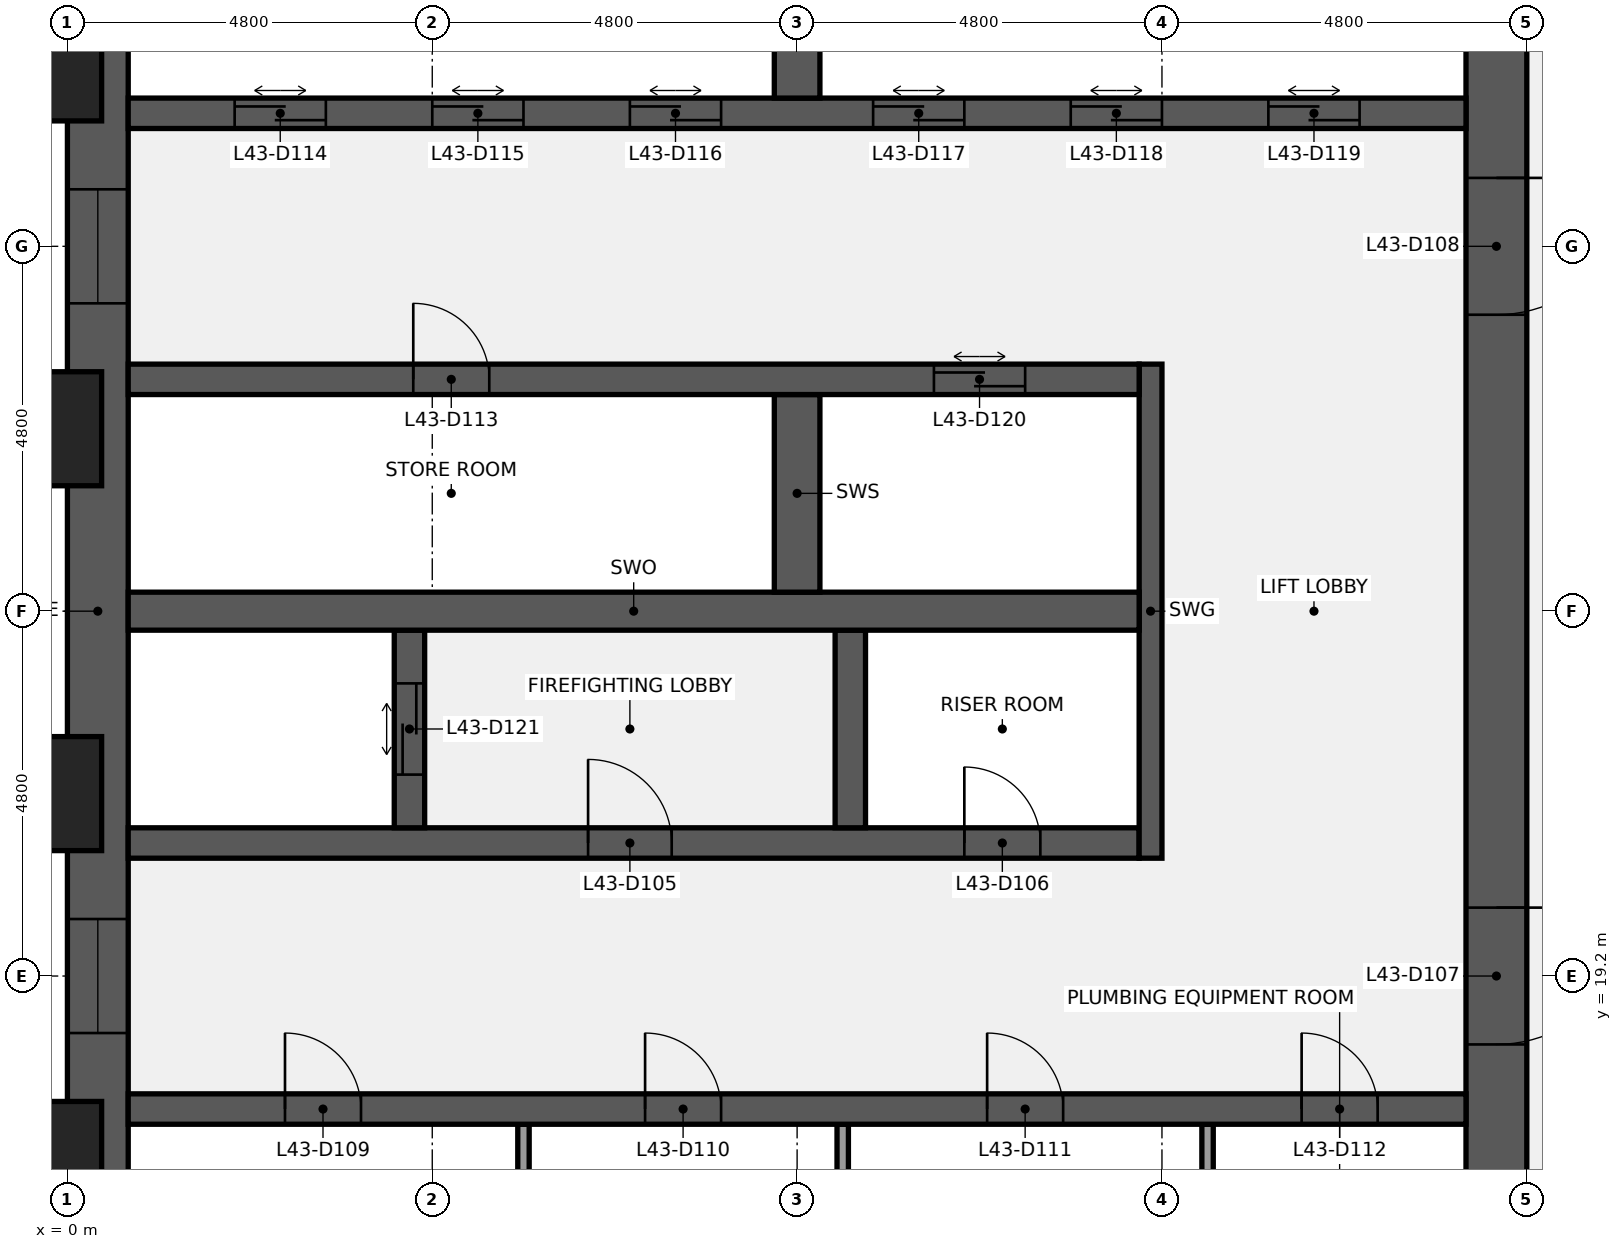
"""IFC4 building model, lengths in metres.
Left out: names, types, materials, properties, quantities, classifications, styles, units other than length and angle.
Written with IfcOpenShell. Run it as: python <this file> out.ifc"""

import sys

from ifc_helpers import new_model, si_unit, direction, frame, frame_2d, origin, origin_2d, place, context, subcontext, project, spatial, rectangle, extrude, element, fill, save


model = new_model("IFC4")
c1 = context("Model", 3, precision=1e-05, world=origin(), true_north=direction((0.0, 1.0)))
c2 = subcontext(c1, "Body", "Model", "MODEL_VIEW")
j1 = project(units=[si_unit("LENGTHUNIT", "METRE"), si_unit("PLANEANGLEUNIT", "RADIAN")], contexts=[c1])
p1 = place(None, origin())
s1 = spatial("IfcSite", under=j1, at=p1, CompositionType="ELEMENT")
p2 = place(p1, origin())
s2 = spatial("IfcBuilding", under=s1, at=p2, CompositionType="ELEMENT")
p3 = place(p2, frame((0.0, 0.0, 201.2)))
s3 = spatial("IfcBuildingStorey", under=s2, at=p3, CompositionType="ELEMENT", Elevation=201.2)
p4 = place(p3, frame((0.4, 9.6, 0.0), z_axis=(0.0, 0.0, 1.0), x_axis=(0.0, 1.0, 0.0)))
e1 = element("IfcWall", 1, at=p4, inside=s3, PredefinedType="SHEAR", context=c2, shape_type="SweptSolid", body=[
    extrude(rectangle(XDim=28.8, YDim=0.8, at=frame_2d((14.4, 0.0))), origin(), (0.0, 0.0, 1.0), 3.84),
])
p5 = place(p4, frame((8.85, 0.0, 0.9)))
e2 = element("IfcOpeningElement", 2, at=p5, cuts=e1, PredefinedType="OPENING", context=c2, shape_type="SweptSolid", body=[
    extrude(rectangle(XDim=1.5, YDim=1.5, at=frame_2d((0.75, 0.75))), frame((0.0, 0.41, 0.0), z_axis=(0.0, -1.0, 0.0), x_axis=(1.0, 0.0, 0.0)), (0.0, 0.0, 1.0), 0.82),
])
p6 = place(p4, frame((18.45, 0.0, 0.9)))
e3 = element("IfcOpeningElement", 3, at=p6, cuts=e1, PredefinedType="OPENING", context=c2, shape_type="SweptSolid", body=[
    extrude(rectangle(XDim=1.5, YDim=1.5, at=frame_2d((0.75, 0.75))), frame((0.0, 0.41, 0.0), z_axis=(0.0, -1.0, 0.0), x_axis=(1.0, 0.0, 0.0)), (0.0, 0.0, 1.0), 0.82),
])
p7 = place(p3, frame((18.8, 38.4, 0.0), z_axis=(0.0, 0.0, 1.0), x_axis=(0.0, -1.0, 0.0)))
e4 = element("IfcWall", 4, at=p7, inside=s3, PredefinedType="SHEAR", context=c2, shape_type="SweptSolid", body=[
    extrude(rectangle(XDim=28.8, YDim=0.8, at=frame_2d((14.4, 0.0))), origin(), (0.0, 0.0, 1.0), 3.84),
])
p8 = place(p7, frame((18.3, 0.0, 0.0)))
e5 = element("IfcOpeningElement", 5, at=p8, cuts=e4, PredefinedType="OPENING", context=c2, shape_type="SweptSolid", body=[
    extrude(rectangle(XDim=1.8, YDim=2.1, at=frame_2d((0.9, 1.05))), frame((0.0, 0.41, 0.0), z_axis=(0.0, -1.0, 0.0), x_axis=(1.0, 0.0, 0.0)), (0.0, 0.0, 1.0), 0.82),
])
p9 = place(p7, frame((8.7, 0.0, 0.0)))
e6 = element("IfcOpeningElement", 6, at=p9, cuts=e4, PredefinedType="OPENING", context=c2, shape_type="SweptSolid", body=[
    extrude(rectangle(XDim=1.8, YDim=2.1, at=frame_2d((0.9, 1.05))), frame((0.0, 0.41, 0.0), z_axis=(0.0, -1.0, 0.0), x_axis=(1.0, 0.0, 0.0)), (0.0, 0.0, 1.0), 0.82),
])
for number, where, z_axis, x_axis in (
    (7, (6.0, 14.65, 0.0), (0.0, 0.0, 1.0), (0.0, 1.0, 0.0)),
    (8, (10.2, 14.65, 0.0), (0.0, 0.0, 1.0), (0.0, 1.0, 0.0)),
    (9, (15.0, 14.65, 0.0), (0.0, 0.0, 1.0), (0.0, 1.0, 0.0)),
):
    element("IfcWall", number, at=place(p3, frame(where, z_axis=z_axis, x_axis=x_axis)), inside=s3, PredefinedType="PARTITIONING", context=c2, shape_type="SweptSolid", body=[
        extrude(rectangle(XDim=2.6, YDim=0.15, at=frame_2d((1.3, 0.0))), origin(), (0.0, 0.0, 1.0), 3.84),
    ])
p10 = place(p3, frame((0.8, 17.45, 0.0), z_axis=(0.0, 0.0, 1.0), x_axis=(1.0, 0.0, 0.0)))
e10 = element("IfcWall", 10, at=p10, inside=s3, PredefinedType="SHEAR", context=c2, shape_type="SweptSolid", body=[
    extrude(rectangle(XDim=17.6, YDim=0.4, at=frame_2d((8.8, 0.0))), origin(), (0.0, 0.0, 1.0), 3.84),
])
p11 = place(p10, frame((2.062, 0.0, 0.0)))
e11 = element("IfcOpeningElement", 11, at=p11, cuts=e10, PredefinedType="OPENING", context=c2, shape_type="SweptSolid", body=[
    extrude(rectangle(XDim=1.0, YDim=2.1, at=frame_2d((0.5, 1.05))), frame((0.0, 0.21, 0.0), z_axis=(0.0, -1.0, 0.0), x_axis=(1.0, 0.0, 0.0)), (0.0, 0.0, 1.0), 0.42),
])
p12 = place(p10, frame((6.8, 0.0, 0.0)))
e12 = element("IfcOpeningElement", 12, at=p12, cuts=e10, PredefinedType="OPENING", context=c2, shape_type="SweptSolid", body=[
    extrude(rectangle(XDim=1.0, YDim=2.1, at=frame_2d((0.5, 1.05))), frame((0.0, 0.21, 0.0), z_axis=(0.0, -1.0, 0.0), x_axis=(1.0, 0.0, 0.0)), (0.0, 0.0, 1.0), 0.42),
])
p13 = place(p10, frame((11.3, 0.0, 0.0)))
e13 = element("IfcOpeningElement", 13, at=p13, cuts=e10, PredefinedType="OPENING", context=c2, shape_type="SweptSolid", body=[
    extrude(rectangle(XDim=1.0, YDim=2.1, at=frame_2d((0.5, 1.05))), frame((0.0, 0.21, 0.0), z_axis=(0.0, -1.0, 0.0), x_axis=(1.0, 0.0, 0.0)), (0.0, 0.0, 1.0), 0.42),
])
p14 = place(p10, frame((15.438, 0.0, 0.0)))
e14 = element("IfcOpeningElement", 14, at=p14, cuts=e10, PredefinedType="OPENING", context=c2, shape_type="SweptSolid", body=[
    extrude(rectangle(XDim=1.0, YDim=2.1, at=frame_2d((0.5, 1.05))), frame((0.0, 0.21, 0.0), z_axis=(0.0, -1.0, 0.0), x_axis=(1.0, 0.0, 0.0)), (0.0, 0.0, 1.0), 0.42),
])
p15 = place(p3, frame((0.8, 20.95, 0.0), z_axis=(0.0, 0.0, 1.0), x_axis=(1.0, 0.0, 0.0)))
e15 = element("IfcWall", 15, at=p15, inside=s3, PredefinedType="SHEAR", context=c2, shape_type="SweptSolid", body=[
    extrude(rectangle(XDim=13.3, YDim=0.4, at=frame_2d((6.65, 0.0))), origin(), (0.0, 0.0, 1.0), 3.84),
])
p16 = place(p15, frame((6.05, 0.0, 0.0)))
e16 = element("IfcOpeningElement", 16, at=p16, cuts=e15, PredefinedType="OPENING", context=c2, shape_type="SweptSolid", body=[
    extrude(rectangle(XDim=1.1, YDim=2.1, at=frame_2d((0.55, 1.05))), frame((0.0, 0.21, 0.0), z_axis=(0.0, -1.0, 0.0), x_axis=(1.0, 0.0, 0.0)), (0.0, 0.0, 1.0), 0.42),
])
p17 = place(p15, frame((11.0, 0.0, 0.0)))
e17 = element("IfcOpeningElement", 17, at=p17, cuts=e15, PredefinedType="OPENING", context=c2, shape_type="SweptSolid", body=[
    extrude(rectangle(XDim=1.0, YDim=2.1, at=frame_2d((0.5, 1.05))), frame((0.0, 0.21, 0.0), z_axis=(0.0, -1.0, 0.0), x_axis=(1.0, 0.0, 0.0)), (0.0, 0.0, 1.0), 0.42),
])
p18 = place(p3, frame((14.25, 20.75, 0.0), z_axis=(0.0, 0.0, 1.0), x_axis=(0.0, 1.0, 0.0)))
e18 = element("IfcWall", 18, at=p18, inside=s3, PredefinedType="SHEAR", context=c2, shape_type="SweptSolid", body=[
    extrude(rectangle(XDim=6.5, YDim=0.3, at=frame_2d((3.25, 0.0))), origin(), (0.0, 0.0, 1.0), 3.84),
])
p19 = place(p3, frame((4.5, 21.15, 0.0), z_axis=(0.0, 0.0, 1.0), x_axis=(0.0, 1.0, 0.0)))
e19 = element("IfcWall", 19, at=p19, inside=s3, PredefinedType="SHEAR", context=c2, shape_type="SweptSolid", body=[
    extrude(rectangle(XDim=2.6, YDim=0.4, at=frame_2d((1.3, 0.0))), origin(), (0.0, 0.0, 1.0), 3.84),
])
p20 = place(p19, frame((0.7, 0.0, 0.0)))
e20 = element("IfcOpeningElement", 20, at=p20, cuts=e19, PredefinedType="OPENING", context=c2, shape_type="SweptSolid", body=[
    extrude(rectangle(XDim=1.2, YDim=2.1, at=frame_2d((0.6, 1.05))), frame((0.0, 0.21, 0.0), z_axis=(0.0, -1.0, 0.0), x_axis=(1.0, 0.0, 0.0)), (0.0, 0.0, 1.0), 0.42),
])
p21 = place(p3, frame((10.3, 21.15, 0.0), z_axis=(0.0, 0.0, 1.0), x_axis=(0.0, 1.0, 0.0)))
e21 = element("IfcWall", 21, at=p21, inside=s3, PredefinedType="SHEAR", context=c2, shape_type="SweptSolid", body=[
    extrude(rectangle(XDim=2.6, YDim=0.4, at=frame_2d((1.3, 0.0))), origin(), (0.0, 0.0, 1.0), 3.84),
])
p22 = place(p3, frame((0.8, 24.0, 0.0), z_axis=(0.0, 0.0, 1.0), x_axis=(1.0, 0.0, 0.0)))
e22 = element("IfcWall", 22, at=p22, inside=s3, PredefinedType="SHEAR", context=c2, shape_type="SweptSolid", body=[
    extrude(rectangle(XDim=13.3, YDim=0.5, at=frame_2d((6.65, 0.0))), origin(), (0.0, 0.0, 1.0), 3.84),
])
p23 = place(p3, frame((9.6, 24.25, 0.0), z_axis=(0.0, 0.0, 1.0), x_axis=(0.0, 1.0, 0.0)))
e23 = element("IfcWall", 23, at=p23, inside=s3, PredefinedType="SHEAR", context=c2, shape_type="SweptSolid", body=[
    extrude(rectangle(XDim=2.6, YDim=0.6, at=frame_2d((1.3, 0.0))), origin(), (0.0, 0.0, 1.0), 3.84),
])
p24 = place(p3, frame((0.8, 27.05, 0.0), z_axis=(0.0, 0.0, 1.0), x_axis=(1.0, 0.0, 0.0)))
e24 = element("IfcWall", 24, at=p24, inside=s3, PredefinedType="SHEAR", context=c2, shape_type="SweptSolid", body=[
    extrude(rectangle(XDim=13.3, YDim=0.4, at=frame_2d((6.65, 0.0))), origin(), (0.0, 0.0, 1.0), 3.84),
])
p25 = place(p24, frame((3.75, 0.0, 0.0)))
e25 = element("IfcOpeningElement", 25, at=p25, cuts=e24, PredefinedType="OPENING", context=c2, shape_type="SweptSolid", body=[
    extrude(rectangle(XDim=1.0, YDim=2.1, at=frame_2d((0.5, 1.05))), frame((0.0, 0.21, 0.0), z_axis=(0.0, -1.0, 0.0), x_axis=(1.0, 0.0, 0.0)), (0.0, 0.0, 1.0), 0.42),
])
p26 = place(p24, frame((10.6, 0.0, 0.0)))
e26 = element("IfcOpeningElement", 26, at=p26, cuts=e24, PredefinedType="OPENING", context=c2, shape_type="SweptSolid", body=[
    extrude(rectangle(XDim=1.2, YDim=2.1, at=frame_2d((0.6, 1.05))), frame((0.0, 0.21, 0.0), z_axis=(0.0, -1.0, 0.0), x_axis=(1.0, 0.0, 0.0)), (0.0, 0.0, 1.0), 0.42),
])
p27 = place(p3, frame((0.8, 30.55, 0.0), z_axis=(0.0, 0.0, 1.0), x_axis=(1.0, 0.0, 0.0)))
e27 = element("IfcWall", 27, at=p27, inside=s3, PredefinedType="SHEAR", context=c2, shape_type="SweptSolid", body=[
    extrude(rectangle(XDim=17.6, YDim=0.4, at=frame_2d((8.8, 0.0))), origin(), (0.0, 0.0, 1.0), 3.84),
])
p28 = place(p27, frame((1.4, 0.0, 0.0)))
e28 = element("IfcOpeningElement", 28, at=p28, cuts=e27, PredefinedType="OPENING", context=c2, shape_type="SweptSolid", body=[
    extrude(rectangle(XDim=1.2, YDim=2.1, at=frame_2d((0.6, 1.05))), frame((0.0, 0.21, 0.0), z_axis=(0.0, -1.0, 0.0), x_axis=(1.0, 0.0, 0.0)), (0.0, 0.0, 1.0), 0.42),
])
p29 = place(p27, frame((4.0, 0.0, 0.0)))
e29 = element("IfcOpeningElement", 29, at=p29, cuts=e27, PredefinedType="OPENING", context=c2, shape_type="SweptSolid", body=[
    extrude(rectangle(XDim=1.2, YDim=2.1, at=frame_2d((0.6, 1.05))), frame((0.0, 0.21, 0.0), z_axis=(0.0, -1.0, 0.0), x_axis=(1.0, 0.0, 0.0)), (0.0, 0.0, 1.0), 0.42),
])
p30 = place(p27, frame((6.6, 0.0, 0.0)))
e30 = element("IfcOpeningElement", 30, at=p30, cuts=e27, PredefinedType="OPENING", context=c2, shape_type="SweptSolid", body=[
    extrude(rectangle(XDim=1.2, YDim=2.1, at=frame_2d((0.6, 1.05))), frame((0.0, 0.21, 0.0), z_axis=(0.0, -1.0, 0.0), x_axis=(1.0, 0.0, 0.0)), (0.0, 0.0, 1.0), 0.42),
])
p31 = place(p27, frame((9.8, 0.0, 0.0)))
e31 = element("IfcOpeningElement", 31, at=p31, cuts=e27, PredefinedType="OPENING", context=c2, shape_type="SweptSolid", body=[
    extrude(rectangle(XDim=1.2, YDim=2.1, at=frame_2d((0.6, 1.05))), frame((0.0, 0.21, 0.0), z_axis=(0.0, -1.0, 0.0), x_axis=(1.0, 0.0, 0.0)), (0.0, 0.0, 1.0), 0.42),
])
p32 = place(p27, frame((12.4, 0.0, 0.0)))
e32 = element("IfcOpeningElement", 32, at=p32, cuts=e27, PredefinedType="OPENING", context=c2, shape_type="SweptSolid", body=[
    extrude(rectangle(XDim=1.2, YDim=2.1, at=frame_2d((0.6, 1.05))), frame((0.0, 0.21, 0.0), z_axis=(0.0, -1.0, 0.0), x_axis=(1.0, 0.0, 0.0)), (0.0, 0.0, 1.0), 0.42),
])
p33 = place(p27, frame((15.0, 0.0, 0.0)))
e33 = element("IfcOpeningElement", 33, at=p33, cuts=e27, PredefinedType="OPENING", context=c2, shape_type="SweptSolid", body=[
    extrude(rectangle(XDim=1.2, YDim=2.1, at=frame_2d((0.6, 1.05))), frame((0.0, 0.21, 0.0), z_axis=(0.0, -1.0, 0.0), x_axis=(1.0, 0.0, 0.0)), (0.0, 0.0, 1.0), 0.42),
])
p34 = place(p3, frame((9.6, 30.75, 0.0), z_axis=(0.0, 0.0, 1.0), x_axis=(0.0, 1.0, 0.0)))
e34 = element("IfcWall", 34, at=p34, inside=s3, PredefinedType="SHEAR", context=c2, shape_type="SweptSolid", body=[
    extrude(rectangle(XDim=2.6, YDim=0.6, at=frame_2d((1.3, 0.0))), origin(), (0.0, 0.0, 1.0), 3.84),
])
for number, where, z_axis, x_axis in (
    (35, (-0.75, 16.8, 0.0), (0.0, 0.0, 1.0), (0.0, 1.0, 0.0)),
    (36, (-0.75, 21.6, 0.0), (0.0, 0.0, 1.0), (0.0, 1.0, 0.0)),
    (37, (-0.75, 26.4, 0.0), (0.0, 0.0, 1.0), (0.0, 1.0, 0.0)),
    (38, (-0.75, 31.2, 0.0), (0.0, 0.0, 1.0), (0.0, 1.0, 0.0)),
):
    element("IfcColumn", number, at=place(p3, frame(where, z_axis=z_axis, x_axis=x_axis)), inside=s3, PredefinedType="PILASTER", context=c2, shape_type="SweptSolid", body=[
        extrude(rectangle(XDim=2.4, YDim=1.5, at=origin_2d()), origin(), (0.0, 0.0, 1.0), 4.0),
    ])
p35 = place(p16, origin())
e39 = element("IfcDoor", 39, at=p35, inside=s3, OperationType="SINGLE_SWING_LEFT", PredefinedType="DOOR", context=c2, shape_type="SweptSolid", body=[
    extrude(rectangle(XDim=1.1, YDim=2.1, at=frame_2d((0.55, 1.05))), frame((0.0, 0.025, 0.0), z_axis=(0.0, -1.0, 0.0), x_axis=(1.0, 0.0, 0.0)), (0.0, 0.0, 1.0), 0.05),
])
fill(e16, e39)
p36 = place(p17, origin())
e40 = element("IfcDoor", 40, at=p36, inside=s3, OperationType="SINGLE_SWING_LEFT", PredefinedType="DOOR", context=c2, shape_type="SweptSolid", body=[
    extrude(rectangle(XDim=1.0, YDim=2.1, at=frame_2d((0.5, 1.05))), frame((0.0, 0.025, 0.0), z_axis=(0.0, -1.0, 0.0), x_axis=(1.0, 0.0, 0.0)), (0.0, 0.0, 1.0), 0.05),
])
fill(e17, e40)
p37 = place(p8, origin())
e41 = element("IfcDoor", 41, at=p37, inside=s3, OperationType="DOUBLE_DOOR_SINGLE_SWING", PredefinedType="DOOR", context=c2, shape_type="SweptSolid", body=[
    extrude(rectangle(XDim=1.8, YDim=2.1, at=frame_2d((0.9, 1.05))), frame((0.0, 0.025, 0.0), z_axis=(0.0, -1.0, 0.0), x_axis=(1.0, 0.0, 0.0)), (0.0, 0.0, 1.0), 0.05),
])
fill(e5, e41)
p38 = place(p9, origin())
e42 = element("IfcDoor", 42, at=p38, inside=s3, OperationType="DOUBLE_DOOR_SINGLE_SWING", PredefinedType="DOOR", context=c2, shape_type="SweptSolid", body=[
    extrude(rectangle(XDim=1.8, YDim=2.1, at=frame_2d((0.9, 1.05))), frame((0.0, 0.025, 0.0), z_axis=(0.0, -1.0, 0.0), x_axis=(1.0, 0.0, 0.0)), (0.0, 0.0, 1.0), 0.05),
])
fill(e6, e42)
p39 = place(p11, origin())
e43 = element("IfcDoor", 43, at=p39, inside=s3, OperationType="SINGLE_SWING_LEFT", PredefinedType="DOOR", context=c2, shape_type="SweptSolid", body=[
    extrude(rectangle(XDim=1.0, YDim=2.1, at=frame_2d((0.5, 1.05))), frame((0.0, 0.025, 0.0), z_axis=(0.0, -1.0, 0.0), x_axis=(1.0, 0.0, 0.0)), (0.0, 0.0, 1.0), 0.05),
])
fill(e11, e43)
p40 = place(p12, origin())
e44 = element("IfcDoor", 44, at=p40, inside=s3, OperationType="SINGLE_SWING_LEFT", PredefinedType="DOOR", context=c2, shape_type="SweptSolid", body=[
    extrude(rectangle(XDim=1.0, YDim=2.1, at=frame_2d((0.5, 1.05))), frame((0.0, 0.025, 0.0), z_axis=(0.0, -1.0, 0.0), x_axis=(1.0, 0.0, 0.0)), (0.0, 0.0, 1.0), 0.05),
])
fill(e12, e44)
p41 = place(p13, origin())
e45 = element("IfcDoor", 45, at=p41, inside=s3, OperationType="SINGLE_SWING_LEFT", PredefinedType="DOOR", context=c2, shape_type="SweptSolid", body=[
    extrude(rectangle(XDim=1.0, YDim=2.1, at=frame_2d((0.5, 1.05))), frame((0.0, 0.025, 0.0), z_axis=(0.0, -1.0, 0.0), x_axis=(1.0, 0.0, 0.0)), (0.0, 0.0, 1.0), 0.05),
])
fill(e13, e45)
p42 = place(p14, origin())
e46 = element("IfcDoor", 46, at=p42, inside=s3, OperationType="SINGLE_SWING_LEFT", PredefinedType="DOOR", context=c2, shape_type="SweptSolid", body=[
    extrude(rectangle(XDim=1.0, YDim=2.1, at=frame_2d((0.5, 1.05))), frame((0.0, 0.025, 0.0), z_axis=(0.0, -1.0, 0.0), x_axis=(1.0, 0.0, 0.0)), (0.0, 0.0, 1.0), 0.05),
])
fill(e14, e46)
p43 = place(p25, origin())
e47 = element("IfcDoor", 47, at=p43, inside=s3, OperationType="SINGLE_SWING_LEFT", PredefinedType="DOOR", context=c2, shape_type="SweptSolid", body=[
    extrude(rectangle(XDim=1.0, YDim=2.1, at=frame_2d((0.5, 1.05))), frame((0.0, 0.025, 0.0), z_axis=(0.0, -1.0, 0.0), x_axis=(1.0, 0.0, 0.0)), (0.0, 0.0, 1.0), 0.05),
])
fill(e25, e47)
p44 = place(p28, origin())
e48 = element("IfcDoor", 48, at=p44, inside=s3, OperationType="DOUBLE_DOOR_SLIDING", PredefinedType="DOOR", context=c2, shape_type="SweptSolid", body=[
    extrude(rectangle(XDim=1.2, YDim=2.1, at=frame_2d((0.6, 1.05))), frame((0.0, 0.025, 0.0), z_axis=(0.0, -1.0, 0.0), x_axis=(1.0, 0.0, 0.0)), (0.0, 0.0, 1.0), 0.05),
])
fill(e28, e48)
p45 = place(p29, origin())
e49 = element("IfcDoor", 49, at=p45, inside=s3, OperationType="DOUBLE_DOOR_SLIDING", PredefinedType="DOOR", context=c2, shape_type="SweptSolid", body=[
    extrude(rectangle(XDim=1.2, YDim=2.1, at=frame_2d((0.6, 1.05))), frame((0.0, 0.025, 0.0), z_axis=(0.0, -1.0, 0.0), x_axis=(1.0, 0.0, 0.0)), (0.0, 0.0, 1.0), 0.05),
])
fill(e29, e49)
p46 = place(p30, origin())
e50 = element("IfcDoor", 50, at=p46, inside=s3, OperationType="DOUBLE_DOOR_SLIDING", PredefinedType="DOOR", context=c2, shape_type="SweptSolid", body=[
    extrude(rectangle(XDim=1.2, YDim=2.1, at=frame_2d((0.6, 1.05))), frame((0.0, 0.025, 0.0), z_axis=(0.0, -1.0, 0.0), x_axis=(1.0, 0.0, 0.0)), (0.0, 0.0, 1.0), 0.05),
])
fill(e30, e50)
p47 = place(p31, origin())
e51 = element("IfcDoor", 51, at=p47, inside=s3, OperationType="DOUBLE_DOOR_SLIDING", PredefinedType="DOOR", context=c2, shape_type="SweptSolid", body=[
    extrude(rectangle(XDim=1.2, YDim=2.1, at=frame_2d((0.6, 1.05))), frame((0.0, 0.025, 0.0), z_axis=(0.0, -1.0, 0.0), x_axis=(1.0, 0.0, 0.0)), (0.0, 0.0, 1.0), 0.05),
])
fill(e31, e51)
p48 = place(p32, origin())
e52 = element("IfcDoor", 52, at=p48, inside=s3, OperationType="DOUBLE_DOOR_SLIDING", PredefinedType="DOOR", context=c2, shape_type="SweptSolid", body=[
    extrude(rectangle(XDim=1.2, YDim=2.1, at=frame_2d((0.6, 1.05))), frame((0.0, 0.025, 0.0), z_axis=(0.0, -1.0, 0.0), x_axis=(1.0, 0.0, 0.0)), (0.0, 0.0, 1.0), 0.05),
])
fill(e32, e52)
p49 = place(p33, origin())
e53 = element("IfcDoor", 53, at=p49, inside=s3, OperationType="DOUBLE_DOOR_SLIDING", PredefinedType="DOOR", context=c2, shape_type="SweptSolid", body=[
    extrude(rectangle(XDim=1.2, YDim=2.1, at=frame_2d((0.6, 1.05))), frame((0.0, 0.025, 0.0), z_axis=(0.0, -1.0, 0.0), x_axis=(1.0, 0.0, 0.0)), (0.0, 0.0, 1.0), 0.05),
])
fill(e33, e53)
p50 = place(p26, origin())
e54 = element("IfcDoor", 54, at=p50, inside=s3, OperationType="DOUBLE_DOOR_SLIDING", PredefinedType="DOOR", context=c2, shape_type="SweptSolid", body=[
    extrude(rectangle(XDim=1.2, YDim=2.1, at=frame_2d((0.6, 1.05))), frame((0.0, 0.025, 0.0), z_axis=(0.0, -1.0, 0.0), x_axis=(1.0, 0.0, 0.0)), (0.0, 0.0, 1.0), 0.05),
])
fill(e26, e54)
p51 = place(p20, origin())
e55 = element("IfcDoor", 55, at=p51, inside=s3, OperationType="DOUBLE_DOOR_SLIDING", PredefinedType="DOOR", context=c2, shape_type="SweptSolid", body=[
    extrude(rectangle(XDim=1.2, YDim=2.1, at=frame_2d((0.6, 1.05))), frame((0.0, 0.025, 0.0), z_axis=(0.0, -1.0, 0.0), x_axis=(1.0, 0.0, 0.0)), (0.0, 0.0, 1.0), 0.05),
])
fill(e20, e55)
p52 = place(p5, origin())
e56 = element("IfcWindow", 56, at=p52, inside=s3, PartitioningType="SINGLE_PANEL", PredefinedType="WINDOW", context=c2, shape_type="SweptSolid", body=[
    extrude(rectangle(XDim=1.5, YDim=1.5, at=frame_2d((0.75, 0.75))), frame((0.0, 0.03, 0.0), z_axis=(0.0, -1.0, 0.0), x_axis=(1.0, 0.0, 0.0)), (0.0, 0.0, 1.0), 0.06),
])
fill(e2, e56)
p53 = place(p6, origin())
e57 = element("IfcWindow", 57, at=p53, inside=s3, PartitioningType="SINGLE_PANEL", PredefinedType="WINDOW", context=c2, shape_type="SweptSolid", body=[
    extrude(rectangle(XDim=1.5, YDim=1.5, at=frame_2d((0.75, 0.75))), frame((0.0, 0.03, 0.0), z_axis=(0.0, -1.0, 0.0), x_axis=(1.0, 0.0, 0.0)), (0.0, 0.0, 1.0), 0.06),
])
fill(e3, e57)
save(model, sys.argv[1])
